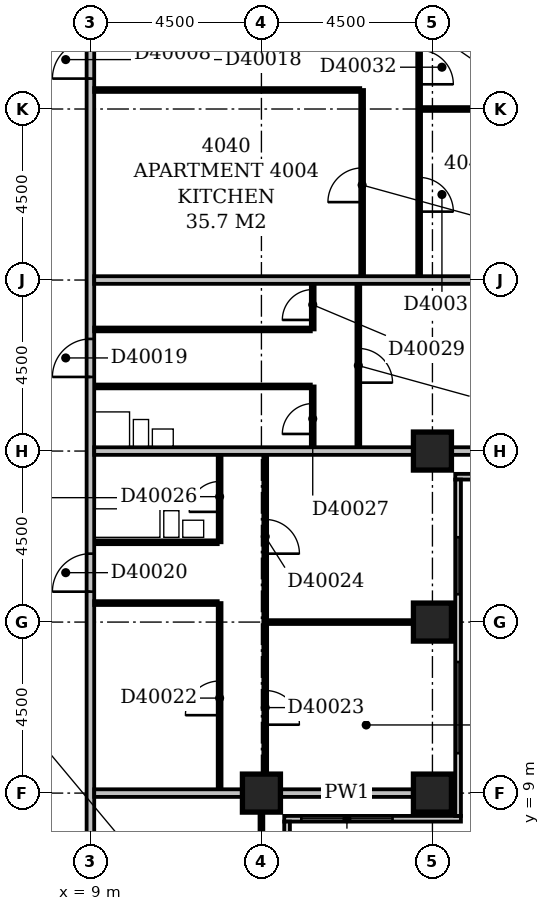
"""IFC4 building model, lengths in metres.
Left out: names, types, materials, properties, quantities, classifications, styles, units other than length and angle.
Written with IfcOpenShell. Run it as: python <this file> out.ifc"""

import sys

from ifc_helpers import new_model, si_unit, direction, frame, frame_2d, origin, origin_2d, place, context, subcontext, project, spatial, rectangle, extrude, element, fill, save


model = new_model("IFC4")
c1 = context("Model", 3, precision=1e-05, world=origin(), true_north=direction((0.0, 1.0)))
c2 = subcontext(c1, "Body", "Model", "MODEL_VIEW")
j1 = project(units=[si_unit("LENGTHUNIT", "METRE"), si_unit("PLANEANGLEUNIT", "RADIAN")], contexts=[c1])
p1 = place(None, origin())
s1 = spatial("IfcSite", under=j1, at=p1, CompositionType="ELEMENT")
p2 = place(p1, origin())
s2 = spatial("IfcBuilding", under=s1, at=p2, CompositionType="ELEMENT")
p3 = place(p2, frame((0.0, 0.0, 159.2)))
s3 = spatial("IfcBuildingStorey", under=s2, at=p3, CompositionType="ELEMENT", Elevation=159.2)
for number, where, z_axis, x_axis in (
    (1, (13.5, 9.0, -0.3), (0.0, 0.0, 1.0), (1.0, 0.0, 0.0)),
    (2, (18.0, 9.0, -0.3), (0.0, 0.0, 1.0), (1.0, 0.0, 0.0)),
    (3, (18.0, 13.5, -0.3), (0.0, 0.0, 1.0), (1.0, 0.0, 0.0)),
    (4, (18.0, 18.0, -0.3), (0.0, 0.0, 1.0), (1.0, 0.0, 0.0)),
):
    element("IfcColumn", number, at=place(p3, frame(where, z_axis=z_axis, x_axis=x_axis)), inside=s3, PredefinedType="COLUMN", context=c2, shape_type="SweptSolid", body=[
        extrude(rectangle(XDim=1.0, YDim=1.0, at=origin_2d()), origin(), (0.0, 0.0, 1.0), 3.6),
    ])
p4 = place(p3, frame((14.175, 3.9, 0.0), z_axis=(0.0, 0.0, 1.0), x_axis=(0.0, 1.0, 0.0)))
e5 = element("IfcWall", 5, at=p4, inside=s3, PredefinedType="STANDARD", context=c2, shape_type="SweptSolid", body=[
    extrude(rectangle(XDim=4.35, YDim=0.15, at=frame_2d((2.175, 0.0))), origin(), (0.0, 0.0, 1.0), 2.7),
])
p5 = place(p4, frame((1.65, 0.0, 0.6)))
e6 = element("IfcOpeningElement", 6, at=p5, cuts=e5, PredefinedType="OPENING", context=c2, shape_type="SweptSolid", body=[
    extrude(rectangle(XDim=2.4, YDim=1.8, at=frame_2d((1.2, 0.9))), frame((0.0, 0.087, 0.0), z_axis=(0.0, -1.0, 0.0), x_axis=(1.0, 0.0, 0.0)), (0.0, 0.0, 1.0), 0.174),
])
p6 = place(p3, frame((14.1, 8.325, 0.0), z_axis=(0.0, 0.0, 1.0), x_axis=(1.0, 0.0, 0.0)))
e7 = element("IfcWall", 7, at=p6, inside=s3, PredefinedType="STANDARD", context=c2, shape_type="SweptSolid", body=[
    extrude(rectangle(XDim=4.65, YDim=0.15, at=frame_2d((2.325, 0.0))), origin(), (0.0, 0.0, 1.0), 2.7),
])
p7 = place(p6, frame((0.45, 0.0, 0.6)))
e8 = element("IfcOpeningElement", 8, at=p7, cuts=e7, PredefinedType="OPENING", context=c2, shape_type="SweptSolid", body=[
    extrude(rectangle(XDim=2.4, YDim=1.8, at=frame_2d((1.2, 0.9))), frame((0.0, 0.087, 0.0), z_axis=(0.0, -1.0, 0.0), x_axis=(1.0, 0.0, 0.0)), (0.0, 0.0, 1.0), 0.174),
])
p8 = place(p3, frame((18.675, 8.4, 0.0), z_axis=(0.0, 0.0, 1.0), x_axis=(0.0, 1.0, 0.0)))
e9 = element("IfcWall", 9, at=p8, inside=s3, PredefinedType="STANDARD", context=c2, shape_type="SweptSolid", body=[
    extrude(rectangle(XDim=8.85, YDim=0.15, at=frame_2d((4.425, 0.0))), origin(), (0.0, 0.0, 1.0), 2.7),
])
p9 = place(p8, frame((1.65, 0.0, 0.6)))
e10 = element("IfcOpeningElement", 10, at=p9, cuts=e9, PredefinedType="OPENING", context=c2, shape_type="SweptSolid", body=[
    extrude(rectangle(XDim=2.4, YDim=1.8, at=frame_2d((1.2, 0.9))), frame((0.0, 0.087, 0.0), z_axis=(0.0, -1.0, 0.0), x_axis=(1.0, 0.0, 0.0)), (0.0, 0.0, 1.0), 0.174),
])
p10 = place(p8, frame((5.832, 0.0, 0.6)))
e11 = element("IfcOpeningElement", 11, at=p10, cuts=e9, PredefinedType="OPENING", context=c2, shape_type="SweptSolid", body=[
    extrude(rectangle(XDim=1.5, YDim=1.8, at=frame_2d((0.75, 0.9))), frame((0.0, 0.087, 0.0), z_axis=(0.0, -1.0, 0.0), x_axis=(1.0, 0.0, 0.0)), (0.0, 0.0, 1.0), 0.174),
])
p11 = place(p3, frame((18.6, 17.325, 0.0), z_axis=(0.0, 0.0, 1.0), x_axis=(1.0, 0.0, 0.0)))
e12 = element("IfcWall", 12, at=p11, inside=s3, PredefinedType="STANDARD", context=c2, shape_type="SweptSolid", body=[
    extrude(rectangle(XDim=4.65, YDim=0.15, at=frame_2d((2.325, 0.0))), origin(), (0.0, 0.0, 1.0), 2.7),
])
p12 = place(p11, frame((0.757, 0.0, 0.6)))
e13 = element("IfcOpeningElement", 13, at=p12, cuts=e12, PredefinedType="OPENING", context=c2, shape_type="SweptSolid", body=[
    extrude(rectangle(XDim=2.4, YDim=1.8, at=frame_2d((1.2, 0.9))), frame((0.0, 0.087, 0.0), z_axis=(0.0, -1.0, 0.0), x_axis=(1.0, 0.0, 0.0)), (0.0, 0.0, 1.0), 0.174),
])
p13 = place(p3, frame((9.0, 5.0, 0.0), z_axis=(0.0, 0.0, 1.0), x_axis=(0.0, 1.0, 0.0)))
e14 = element("IfcWall", 14, at=p13, inside=s3, PredefinedType="PARTITIONING", context=c2, shape_type="SweptSolid", body=[
    extrude(rectangle(XDim=27.75, YDim=0.2, at=frame_2d((13.875, 0.0))), origin(), (0.0, 0.0, 1.0), 3.3),
])
p14 = place(p13, frame((22.8, 0.0, 0.0)))
e15 = element("IfcOpeningElement", 15, at=p14, cuts=e14, PredefinedType="OPENING", context=c2, shape_type="SweptSolid", body=[
    extrude(rectangle(XDim=1.0, YDim=2.1, at=frame_2d((0.5, 1.05))), frame((0.0, 0.112, 0.0), z_axis=(0.0, -1.0, 0.0), x_axis=(1.0, 0.0, 0.0)), (0.0, 0.0, 1.0), 0.224),
])
p15 = place(p13, frame((14.95, 0.0, 0.0)))
e16 = element("IfcOpeningElement", 16, at=p15, cuts=e14, PredefinedType="OPENING", context=c2, shape_type="SweptSolid", body=[
    extrude(rectangle(XDim=1.0, YDim=2.1, at=frame_2d((0.5, 1.05))), frame((0.0, 0.112, 0.0), z_axis=(0.0, -1.0, 0.0), x_axis=(1.0, 0.0, 0.0)), (0.0, 0.0, 1.0), 0.224),
])
p16 = place(p13, frame((9.3, 0.0, 0.0)))
e17 = element("IfcOpeningElement", 17, at=p16, cuts=e14, PredefinedType="OPENING", context=c2, shape_type="SweptSolid", body=[
    extrude(rectangle(XDim=1.0, YDim=2.1, at=frame_2d((0.5, 1.05))), frame((0.0, 0.112, 0.0), z_axis=(0.0, -1.0, 0.0), x_axis=(1.0, 0.0, 0.0)), (0.0, 0.0, 1.0), 0.224),
])
p17 = place(p13, frame((1.5, 0.0, 0.0)))
e18 = element("IfcOpeningElement", 18, at=p17, cuts=e14, PredefinedType="OPENING", context=c2, shape_type="SweptSolid", body=[
    extrude(rectangle(XDim=0.9, YDim=2.1, at=frame_2d((0.45, 1.05))), frame((0.0, 0.112, 0.0), z_axis=(0.0, -1.0, 0.0), x_axis=(1.0, 0.0, 0.0)), (0.0, 0.0, 1.0), 0.224),
])
p18 = place(p3, frame((13.5, 5.0, 0.0), z_axis=(0.0, 0.0, 1.0), x_axis=(0.0, 1.0, 0.0)))
e19 = element("IfcWall", 19, at=p18, inside=s3, PredefinedType="PARTITIONING", context=c2, shape_type="SweptSolid", body=[
    extrude(rectangle(XDim=3.5, YDim=0.1, at=frame_2d((1.75, 0.0))), origin(), (0.0, 0.0, 1.0), 2.7),
])
p19 = place(p3, frame((9.1, 9.0, 0.0), z_axis=(0.0, 0.0, 1.0), x_axis=(1.0, 0.0, 0.0)))
e20 = element("IfcWall", 20, at=p19, inside=s3, PredefinedType="PARTITIONING", context=c2, shape_type="SweptSolid", body=[
    extrude(rectangle(XDim=3.9, YDim=0.2, at=frame_2d((1.95, 0.0))), origin(), (0.0, 0.0, 1.0), 3.3),
])
p20 = place(p3, frame((14.0, 9.0, 0.0), z_axis=(0.0, 0.0, 1.0), x_axis=(1.0, 0.0, 0.0)))
e21 = element("IfcWall", 21, at=p20, inside=s3, PredefinedType="PARTITIONING", context=c2, shape_type="SweptSolid", body=[
    extrude(rectangle(XDim=3.5, YDim=0.2, at=frame_2d((1.75, 0.0))), origin(), (0.0, 0.0, 1.0), 2.7),
])
p21 = place(p3, frame((12.4, 9.1, 0.0), z_axis=(0.0, 0.0, 1.0), x_axis=(0.0, 1.0, 0.0)))
e22 = element("IfcWall", 22, at=p21, inside=s3, PredefinedType="PARTITIONING", context=c2, shape_type="SweptSolid", body=[
    extrude(rectangle(XDim=4.9, YDim=0.1, at=frame_2d((2.45, 0.0))), origin(), (0.0, 0.0, 1.0), 3.3),
])
p22 = place(p21, frame((1.95, 0.0, 0.0)))
e23 = element("IfcOpeningElement", 23, at=p22, cuts=e22, PredefinedType="OPENING", context=c2, shape_type="SweptSolid", body=[
    extrude(rectangle(XDim=0.9, YDim=2.1, at=frame_2d((0.45, 1.05))), frame((0.0, 0.062, 0.0), z_axis=(0.0, -1.0, 0.0), x_axis=(1.0, 0.0, 0.0)), (0.0, 0.0, 1.0), 0.124),
])
p23 = place(p3, frame((13.6, 9.5, 0.0), z_axis=(0.0, 0.0, 1.0), x_axis=(0.0, 1.0, 0.0)))
e24 = element("IfcWall", 24, at=p23, inside=s3, PredefinedType="PARTITIONING", context=c2, shape_type="SweptSolid", body=[
    extrude(rectangle(XDim=8.4, YDim=0.1, at=frame_2d((4.2, 0.0))), origin(), (0.0, 0.0, 1.0), 3.3),
])
p24 = place(p23, frame((1.3, 0.0, 0.0)))
e25 = element("IfcOpeningElement", 25, at=p24, cuts=e24, PredefinedType="OPENING", context=c2, shape_type="SweptSolid", body=[
    extrude(rectangle(XDim=0.9, YDim=2.1, at=frame_2d((0.45, 1.05))), frame((0.0, 0.062, 0.0), z_axis=(0.0, -1.0, 0.0), x_axis=(1.0, 0.0, 0.0)), (0.0, 0.0, 1.0), 0.124),
])
p25 = place(p23, frame((5.8, 0.0, 0.0)))
e26 = element("IfcOpeningElement", 26, at=p25, cuts=e24, PredefinedType="OPENING", context=c2, shape_type="SweptSolid", body=[
    extrude(rectangle(XDim=0.9, YDim=2.1, at=frame_2d((0.45, 1.05))), frame((0.0, 0.062, 0.0), z_axis=(0.0, -1.0, 0.0), x_axis=(1.0, 0.0, 0.0)), (0.0, 0.0, 1.0), 0.124),
])
p26 = place(p3, frame((13.65, 13.5, 0.0), z_axis=(0.0, 0.0, 1.0), x_axis=(1.0, 0.0, 0.0)))
e27 = element("IfcWall", 27, at=p26, inside=s3, PredefinedType="PARTITIONING", context=c2, shape_type="SweptSolid", body=[
    extrude(rectangle(XDim=3.85, YDim=0.1, at=frame_2d((1.925, 0.0))), origin(), (0.0, 0.0, 1.0), 3.3),
])
p27 = place(p3, frame((9.1, 14.0, 0.0), z_axis=(0.0, 0.0, 1.0), x_axis=(1.0, 0.0, 0.0)))
e28 = element("IfcWall", 28, at=p27, inside=s3, PredefinedType="PARTITIONING", context=c2, shape_type="SweptSolid", body=[
    extrude(rectangle(XDim=3.25, YDim=0.1, at=frame_2d((1.625, 0.0))), origin(), (0.0, 0.0, 1.0), 3.3),
])
p28 = place(p3, frame((9.1, 15.6, 0.0), z_axis=(0.0, 0.0, 1.0), x_axis=(1.0, 0.0, 0.0)))
e29 = element("IfcWall", 29, at=p28, inside=s3, PredefinedType="PLUMBINGWALL", context=c2, shape_type="SweptSolid", body=[
    extrude(rectangle(XDim=3.25, YDim=0.1, at=frame_2d((1.625, 0.0))), origin(), (0.0, 0.0, 1.0), 3.3),
])
p29 = place(p3, frame((12.4, 15.6, 0.0), z_axis=(0.0, 0.0, 1.0), x_axis=(0.0, 1.0, 0.0)))
e30 = element("IfcWall", 30, at=p29, inside=s3, PredefinedType="PARTITIONING", context=c2, shape_type="SweptSolid", body=[
    extrude(rectangle(XDim=2.3, YDim=0.1, at=frame_2d((1.15, 0.0))), origin(), (0.0, 0.0, 1.0), 3.3),
])
p30 = place(p29, frame((0.8, 0.0, 0.0)))
e31 = element("IfcOpeningElement", 31, at=p30, cuts=e30, PredefinedType="OPENING", context=c2, shape_type="SweptSolid", body=[
    extrude(rectangle(XDim=0.8, YDim=2.1, at=frame_2d((0.4, 1.05))), frame((0.0, 0.062, 0.0), z_axis=(0.0, -1.0, 0.0), x_axis=(1.0, 0.0, 0.0)), (0.0, 0.0, 1.0), 0.124),
])
p31 = place(p3, frame((9.1, 18.0, 0.0), z_axis=(0.0, 0.0, 1.0), x_axis=(1.0, 0.0, 0.0)))
e32 = element("IfcWall", 32, at=p31, inside=s3, PredefinedType="PARTITIONING", context=c2, shape_type="SweptSolid", body=[
    extrude(rectangle(XDim=8.4, YDim=0.2, at=frame_2d((4.2, 0.0))), origin(), (0.0, 0.0, 1.0), 2.6),
])
p32 = place(p3, frame((18.5, 18.0, 0.0), z_axis=(0.0, 0.0, 1.0), x_axis=(1.0, 0.0, 0.0)))
e33 = element("IfcWall", 33, at=p32, inside=s3, PredefinedType="PARTITIONING", context=c2, shape_type="SweptSolid", body=[
    extrude(rectangle(XDim=3.5, YDim=0.2, at=frame_2d((1.75, 0.0))), origin(), (0.0, 0.0, 1.0), 2.7),
])
p33 = place(p3, frame((14.85, 18.1, 0.0), z_axis=(0.0, 0.0, 1.0), x_axis=(0.0, 1.0, 0.0)))
e34 = element("IfcWall", 34, at=p33, inside=s3, PredefinedType="PARTITIONING", context=c2, shape_type="SweptSolid", body=[
    extrude(rectangle(XDim=1.6, YDim=0.1, at=frame_2d((0.8, 0.0))), origin(), (0.0, 0.0, 1.0), 3.3),
])
p34 = place(p33, frame((0.35, 0.0, 0.0)))
e35 = element("IfcOpeningElement", 35, at=p34, cuts=e34, PredefinedType="OPENING", context=c2, shape_type="SweptSolid", body=[
    extrude(rectangle(XDim=0.8, YDim=2.1, at=frame_2d((0.4, 1.05))), frame((0.0, 0.062, 0.0), z_axis=(0.0, -1.0, 0.0), x_axis=(1.0, 0.0, 0.0)), (0.0, 0.0, 1.0), 0.124),
])
p35 = place(p3, frame((16.05, 18.1, 0.0), z_axis=(0.0, 0.0, 1.0), x_axis=(0.0, 1.0, 0.0)))
e36 = element("IfcWall", 36, at=p35, inside=s3, PredefinedType="PARTITIONING", context=c2, shape_type="SweptSolid", body=[
    extrude(rectangle(XDim=4.3, YDim=0.1, at=frame_2d((2.15, 0.0))), origin(), (0.0, 0.0, 1.0), 3.3),
])
p36 = place(p35, frame((1.7, 0.0, 0.0)))
e37 = element("IfcOpeningElement", 37, at=p36, cuts=e36, PredefinedType="OPENING", context=c2, shape_type="SweptSolid", body=[
    extrude(rectangle(XDim=0.9, YDim=2.1, at=frame_2d((0.45, 1.05))), frame((0.0, 0.062, 0.0), z_axis=(0.0, -1.0, 0.0), x_axis=(1.0, 0.0, 0.0)), (0.0, 0.0, 1.0), 0.124),
])
p37 = place(p3, frame((9.1, 19.7, 0.0), z_axis=(0.0, 0.0, 1.0), x_axis=(1.0, 0.0, 0.0)))
e38 = element("IfcWall", 38, at=p37, inside=s3, PredefinedType="PLUMBINGWALL", context=c2, shape_type="SweptSolid", body=[
    extrude(rectangle(XDim=5.7, YDim=0.1, at=frame_2d((2.85, 0.0))), origin(), (0.0, 0.0, 1.0), 3.3),
])
p38 = place(p3, frame((9.1, 21.2, 0.0), z_axis=(0.0, 0.0, 1.0), x_axis=(1.0, 0.0, 0.0)))
e39 = element("IfcWall", 39, at=p38, inside=s3, PredefinedType="PARTITIONING", context=c2, shape_type="SweptSolid", body=[
    extrude(rectangle(XDim=5.7, YDim=0.1, at=frame_2d((2.85, 0.0))), origin(), (0.0, 0.0, 1.0), 3.3),
])
p39 = place(p3, frame((14.85, 21.2, 0.0), z_axis=(0.0, 0.0, 1.0), x_axis=(0.0, 1.0, 0.0)))
e40 = element("IfcWall", 40, at=p39, inside=s3, PredefinedType="PARTITIONING", context=c2, shape_type="SweptSolid", body=[
    extrude(rectangle(XDim=1.2, YDim=0.1, at=frame_2d((0.6, 0.0))), origin(), (0.0, 0.0, 1.0), 3.3),
])
p40 = place(p39, frame((0.25, 0.0, 0.0)))
e41 = element("IfcOpeningElement", 41, at=p40, cuts=e40, PredefinedType="OPENING", context=c2, shape_type="SweptSolid", body=[
    extrude(rectangle(XDim=0.8, YDim=2.1, at=frame_2d((0.4, 1.05))), frame((0.0, 0.062, 0.0), z_axis=(0.0, -1.0, 0.0), x_axis=(1.0, 0.0, 0.0)), (0.0, 0.0, 1.0), 0.124),
])
p41 = place(p3, frame((9.1, 22.5, 0.0), z_axis=(0.0, 0.0, 1.0), x_axis=(1.0, 0.0, 0.0)))
e42 = element("IfcWall", 42, at=p41, inside=s3, PredefinedType="PARTITIONING", context=c2, shape_type="SweptSolid", body=[
    extrude(rectangle(XDim=12.9, YDim=0.2, at=frame_2d((6.45, 0.0))), origin(), (0.0, 0.0, 1.0), 3.3),
])
p42 = place(p3, frame((16.15, 22.6, 0.0), z_axis=(0.0, 0.0, 1.0), x_axis=(0.0, 1.0, 0.0)))
e43 = element("IfcWall", 43, at=p42, inside=s3, PredefinedType="PARTITIONING", context=c2, shape_type="SweptSolid", body=[
    extrude(rectangle(XDim=4.9, YDim=0.1, at=frame_2d((2.45, 0.0))), origin(), (0.0, 0.0, 1.0), 3.3),
])
p43 = place(p42, frame((1.95, 0.0, 0.0)))
e44 = element("IfcOpeningElement", 44, at=p43, cuts=e43, PredefinedType="OPENING", context=c2, shape_type="SweptSolid", body=[
    extrude(rectangle(XDim=0.9, YDim=2.1, at=frame_2d((0.45, 1.05))), frame((0.0, 0.062, 0.0), z_axis=(0.0, -1.0, 0.0), x_axis=(1.0, 0.0, 0.0)), (0.0, 0.0, 1.0), 0.124),
])
p44 = place(p3, frame((17.65, 22.6, 0.0), z_axis=(0.0, 0.0, 1.0), x_axis=(0.0, 1.0, 0.0)))
e45 = element("IfcWall", 45, at=p44, inside=s3, PredefinedType="PARTITIONING", context=c2, shape_type="SweptSolid", body=[
    extrude(rectangle(XDim=8.8, YDim=0.1, at=frame_2d((4.4, 0.0))), origin(), (0.0, 0.0, 1.0), 3.3),
])
p45 = place(p44, frame((1.7, 0.0, 0.0)))
e46 = element("IfcOpeningElement", 46, at=p45, cuts=e45, PredefinedType="OPENING", context=c2, shape_type="SweptSolid", body=[
    extrude(rectangle(XDim=0.9, YDim=2.1, at=frame_2d((0.45, 1.05))), frame((0.0, 0.062, 0.0), z_axis=(0.0, -1.0, 0.0), x_axis=(1.0, 0.0, 0.0)), (0.0, 0.0, 1.0), 0.124),
])
p46 = place(p44, frame((5.05, 0.0, 0.0)))
e47 = element("IfcOpeningElement", 47, at=p46, cuts=e45, PredefinedType="OPENING", context=c2, shape_type="SweptSolid", body=[
    extrude(rectangle(XDim=0.9, YDim=2.1, at=frame_2d((0.45, 1.05))), frame((0.0, 0.062, 0.0), z_axis=(0.0, -1.0, 0.0), x_axis=(1.0, 0.0, 0.0)), (0.0, 0.0, 1.0), 0.124),
])
p47 = place(p3, frame((17.7, 27.0, 0.0), z_axis=(0.0, 0.0, 1.0), x_axis=(1.0, 0.0, 0.0)))
e48 = element("IfcWall", 48, at=p47, inside=s3, PredefinedType="PARTITIONING", context=c2, shape_type="SweptSolid", body=[
    extrude(rectangle(XDim=4.3, YDim=0.1, at=frame_2d((2.15, 0.0))), origin(), (0.0, 0.0, 1.0), 2.7),
])
p48 = place(p3, frame((9.1, 27.5, 0.0), z_axis=(0.0, 0.0, 1.0), x_axis=(1.0, 0.0, 0.0)))
e49 = element("IfcWall", 49, at=p48, inside=s3, PredefinedType="PARTITIONING", context=c2, shape_type="SweptSolid", body=[
    extrude(rectangle(XDim=7.0, YDim=0.1, at=frame_2d((3.5, 0.0))), origin(), (0.0, 0.0, 1.0), 2.7),
])
p49 = place(p7, origin())
e50 = element("IfcWindow", 50, at=p49, inside=s3, PartitioningType="SINGLE_PANEL", PredefinedType="WINDOW", context=c2, shape_type="SweptSolid", body=[
    extrude(rectangle(XDim=2.4, YDim=1.8, at=frame_2d((1.2, 0.9))), frame((0.0, 0.03, 0.0), z_axis=(0.0, -1.0, 0.0), x_axis=(1.0, 0.0, 0.0)), (0.0, 0.0, 1.0), 0.06),
])
fill(e8, e50)
p50 = place(p9, origin())
e51 = element("IfcWindow", 51, at=p50, inside=s3, PartitioningType="SINGLE_PANEL", PredefinedType="WINDOW", context=c2, shape_type="SweptSolid", body=[
    extrude(rectangle(XDim=2.4, YDim=1.8, at=frame_2d((1.2, 0.9))), frame((0.0, 0.03, 0.0), z_axis=(0.0, -1.0, 0.0), x_axis=(1.0, 0.0, 0.0)), (0.0, 0.0, 1.0), 0.06),
])
fill(e10, e51)
p51 = place(p10, origin())
e52 = element("IfcWindow", 52, at=p51, inside=s3, PartitioningType="SINGLE_PANEL", PredefinedType="WINDOW", context=c2, shape_type="SweptSolid", body=[
    extrude(rectangle(XDim=1.5, YDim=1.8, at=frame_2d((0.75, 0.9))), frame((0.0, 0.03, 0.0), z_axis=(0.0, -1.0, 0.0), x_axis=(1.0, 0.0, 0.0)), (0.0, 0.0, 1.0), 0.06),
])
fill(e11, e52)
p52 = place(p14, origin())
e53 = element("IfcDoor", 53, at=p52, inside=s3, OperationType="SINGLE_SWING_LEFT", PredefinedType="DOOR", context=c2, shape_type="SweptSolid", body=[
    extrude(rectangle(XDim=1.0, YDim=2.1, at=frame_2d((0.5, 1.05))), frame((0.0, 0.025, 0.0), z_axis=(0.0, -1.0, 0.0), x_axis=(1.0, 0.0, 0.0)), (0.0, 0.0, 1.0), 0.05),
])
fill(e15, e53)
p53 = place(p15, origin())
e54 = element("IfcDoor", 54, at=p53, inside=s3, OperationType="SINGLE_SWING_LEFT", PredefinedType="DOOR", context=c2, shape_type="SweptSolid", body=[
    extrude(rectangle(XDim=1.0, YDim=2.1, at=frame_2d((0.5, 1.05))), frame((0.0, 0.025, 0.0), z_axis=(0.0, -1.0, 0.0), x_axis=(1.0, 0.0, 0.0)), (0.0, 0.0, 1.0), 0.05),
])
fill(e16, e54)
p54 = place(p16, origin())
e55 = element("IfcDoor", 55, at=p54, inside=s3, OperationType="SINGLE_SWING_LEFT", PredefinedType="DOOR", context=c2, shape_type="SweptSolid", body=[
    extrude(rectangle(XDim=1.0, YDim=2.1, at=frame_2d((0.5, 1.05))), frame((0.0, 0.025, 0.0), z_axis=(0.0, -1.0, 0.0), x_axis=(1.0, 0.0, 0.0)), (0.0, 0.0, 1.0), 0.05),
])
fill(e17, e55)
p55 = place(p22, origin())
e56 = element("IfcDoor", 56, at=p55, inside=s3, OperationType="SINGLE_SWING_LEFT", PredefinedType="DOOR", context=c2, shape_type="SweptSolid", body=[
    extrude(rectangle(XDim=0.9, YDim=2.1, at=frame_2d((0.45, 1.05))), frame((0.0, 0.025, 0.0), z_axis=(0.0, -1.0, 0.0), x_axis=(1.0, 0.0, 0.0)), (0.0, 0.0, 1.0), 0.05),
])
fill(e23, e56)
p56 = place(p24, frame((0.9, 0.0, 0.0), z_axis=(0.0, 0.0, 1.0), x_axis=(-1.0, 0.0, 0.0)))
e57 = element("IfcDoor", 57, at=p56, inside=s3, OperationType="SINGLE_SWING_RIGHT", PredefinedType="DOOR", context=c2, shape_type="SweptSolid", body=[
    extrude(rectangle(XDim=0.9, YDim=2.1, at=frame_2d((0.45, 1.05))), frame((0.0, 0.025, 0.0), z_axis=(0.0, -1.0, 0.0), x_axis=(1.0, 0.0, 0.0)), (0.0, 0.0, 1.0), 0.05),
])
fill(e25, e57)
p57 = place(p25, frame((0.9, 0.0, 0.0), z_axis=(0.0, 0.0, 1.0), x_axis=(-1.0, 0.0, 0.0)))
e58 = element("IfcDoor", 58, at=p57, inside=s3, OperationType="SINGLE_SWING_RIGHT", PredefinedType="DOOR", context=c2, shape_type="SweptSolid", body=[
    extrude(rectangle(XDim=0.9, YDim=2.1, at=frame_2d((0.45, 1.05))), frame((0.0, 0.025, 0.0), z_axis=(0.0, -1.0, 0.0), x_axis=(1.0, 0.0, 0.0)), (0.0, 0.0, 1.0), 0.05),
])
fill(e26, e58)
p58 = place(p30, origin())
e59 = element("IfcDoor", 59, at=p58, inside=s3, OperationType="SINGLE_SWING_LEFT", PredefinedType="DOOR", context=c2, shape_type="SweptSolid", body=[
    extrude(rectangle(XDim=0.8, YDim=2.1, at=frame_2d((0.4, 1.05))), frame((0.0, 0.025, 0.0), z_axis=(0.0, -1.0, 0.0), x_axis=(1.0, 0.0, 0.0)), (0.0, 0.0, 1.0), 0.05),
])
fill(e31, e59)
p59 = place(p34, origin())
e60 = element("IfcDoor", 60, at=p59, inside=s3, OperationType="SINGLE_SWING_LEFT", PredefinedType="DOOR", context=c2, shape_type="SweptSolid", body=[
    extrude(rectangle(XDim=0.8, YDim=2.1, at=frame_2d((0.4, 1.05))), frame((0.0, 0.025, 0.0), z_axis=(0.0, -1.0, 0.0), x_axis=(1.0, 0.0, 0.0)), (0.0, 0.0, 1.0), 0.05),
])
fill(e35, e60)
p60 = place(p36, frame((0.9, 0.0, 0.0), z_axis=(0.0, 0.0, 1.0), x_axis=(-1.0, 0.0, 0.0)))
e61 = element("IfcDoor", 61, at=p60, inside=s3, OperationType="SINGLE_SWING_RIGHT", PredefinedType="DOOR", context=c2, shape_type="SweptSolid", body=[
    extrude(rectangle(XDim=0.9, YDim=2.1, at=frame_2d((0.45, 1.05))), frame((0.0, 0.025, 0.0), z_axis=(0.0, -1.0, 0.0), x_axis=(1.0, 0.0, 0.0)), (0.0, 0.0, 1.0), 0.05),
])
fill(e37, e61)
p61 = place(p40, origin())
e62 = element("IfcDoor", 62, at=p61, inside=s3, OperationType="SINGLE_SWING_LEFT", PredefinedType="DOOR", context=c2, shape_type="SweptSolid", body=[
    extrude(rectangle(XDim=0.8, YDim=2.1, at=frame_2d((0.4, 1.05))), frame((0.0, 0.025, 0.0), z_axis=(0.0, -1.0, 0.0), x_axis=(1.0, 0.0, 0.0)), (0.0, 0.0, 1.0), 0.05),
])
fill(e41, e62)
p62 = place(p43, origin())
e63 = element("IfcDoor", 63, at=p62, inside=s3, OperationType="SINGLE_SWING_LEFT", PredefinedType="DOOR", context=c2, shape_type="SweptSolid", body=[
    extrude(rectangle(XDim=0.9, YDim=2.1, at=frame_2d((0.45, 1.05))), frame((0.0, 0.025, 0.0), z_axis=(0.0, -1.0, 0.0), x_axis=(1.0, 0.0, 0.0)), (0.0, 0.0, 1.0), 0.05),
])
fill(e44, e63)
p63 = place(p45, frame((0.9, 0.0, 0.0), z_axis=(0.0, 0.0, 1.0), x_axis=(-1.0, 0.0, 0.0)))
e64 = element("IfcDoor", 64, at=p63, inside=s3, OperationType="SINGLE_SWING_RIGHT", PredefinedType="DOOR", context=c2, shape_type="SweptSolid", body=[
    extrude(rectangle(XDim=0.9, YDim=2.1, at=frame_2d((0.45, 1.05))), frame((0.0, 0.025, 0.0), z_axis=(0.0, -1.0, 0.0), x_axis=(1.0, 0.0, 0.0)), (0.0, 0.0, 1.0), 0.05),
])
fill(e46, e64)
p64 = place(p46, frame((0.9, 0.0, 0.0), z_axis=(0.0, 0.0, 1.0), x_axis=(-1.0, 0.0, 0.0)))
e65 = element("IfcDoor", 65, at=p64, inside=s3, OperationType="SINGLE_SWING_RIGHT", PredefinedType="DOOR", context=c2, shape_type="SweptSolid", body=[
    extrude(rectangle(XDim=0.9, YDim=2.1, at=frame_2d((0.45, 1.05))), frame((0.0, 0.025, 0.0), z_axis=(0.0, -1.0, 0.0), x_axis=(1.0, 0.0, 0.0)), (0.0, 0.0, 1.0), 0.05),
])
fill(e47, e65)
save(model, sys.argv[1])
